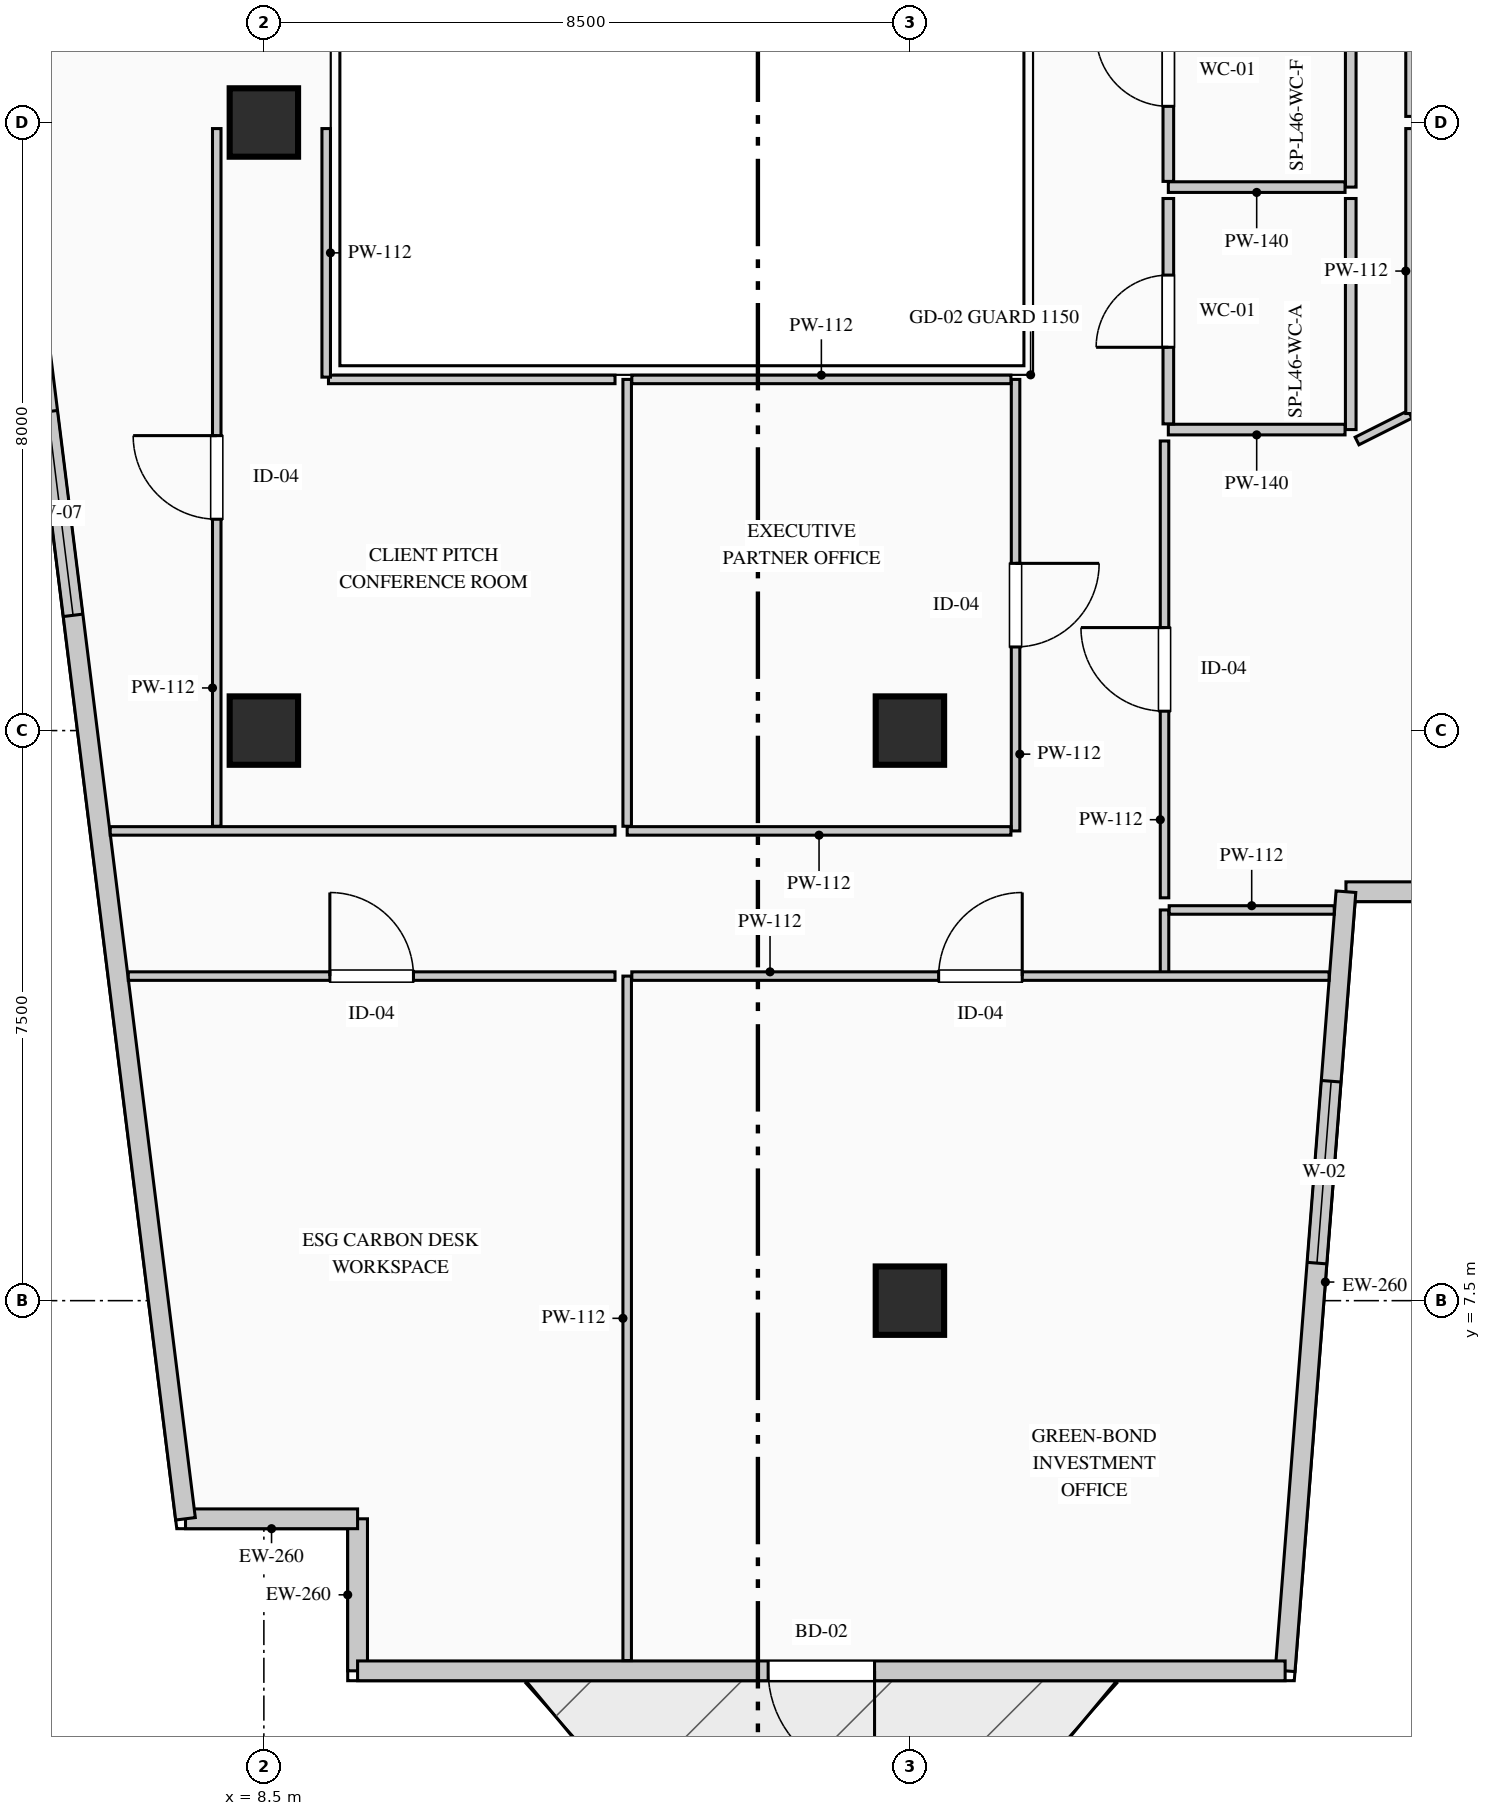
"""IFC4 building model, lengths in metres.
Left out: names, types, materials, properties, quantities, classifications, styles, units other than length and angle.
Written with IfcOpenShell. Run it as: python <this file> out.ifc"""

import sys

from ifc_helpers import new_model, si_unit, direction, frame, frame_2d, origin, origin_2d, place, context, subcontext, project, spatial, rectangle, extrude, element, fill, save


model = new_model("IFC4")
c1 = context("Model", 3, precision=1e-05, world=origin(), true_north=direction((0.0, 1.0)))
c2 = subcontext(c1, "Body", "Model", "MODEL_VIEW")
j1 = project(units=[si_unit("LENGTHUNIT", "METRE"), si_unit("PLANEANGLEUNIT", "RADIAN")], contexts=[c1])
p1 = place(None, origin())
s1 = spatial("IfcSite", under=j1, at=p1, CompositionType="ELEMENT")
p2 = place(p1, origin())
s2 = spatial("IfcBuilding", under=s1, at=p2, CompositionType="ELEMENT")
p3 = place(p2, frame((0.0, 0.0, 195.6)))
s3 = spatial("IfcBuildingStorey", under=s2, at=p3, CompositionType="ELEMENT", Elevation=195.6)
for number, where, z_axis, x_axis in (
    (1, (8.5, 15.0, 0.0), (0.0, 0.0, 1.0), (1.0, 0.0, 0.0)),
    (2, (8.5, 23.0, 0.0), (0.0, 0.0, 1.0), (1.0, 0.0, 0.0)),
    (3, (17.0, 7.5, 0.0), (0.0, 0.0, 1.0), (1.0, 0.0, 0.0)),
    (4, (17.0, 15.0, 0.0), (0.0, 0.0, 1.0), (1.0, 0.0, 0.0)),
):
    element("IfcColumn", number, at=place(p3, frame(where, z_axis=z_axis, x_axis=x_axis)), inside=s3, PredefinedType="COLUMN", context=c2, shape_type="SweptSolid", body=[
        extrude(rectangle(XDim=0.9, YDim=0.9, at=origin_2d()), origin(), (0.0, 0.0, 1.0), 3.95),
    ])
p4 = place(p3, frame((9.733, 2.63, 0.0), z_axis=(0.0, 0.0, 1.0), x_axis=(0.0, 1.0, 0.0)))
e5 = element("IfcWall", 5, at=p4, inside=s3, PredefinedType="STANDARD", context=c2, shape_type="SweptSolid", body=[
    extrude(rectangle(XDim=2.0, YDim=0.26, at=frame_2d((1.0, 0.0))), origin(), (0.0, 0.0, 1.0), 3.7),
])
p5 = place(p3, frame((9.733, 4.63, 0.0), z_axis=(0.0, 0.0, 1.0), x_axis=(-1.0, 0.0, 0.0)))
e6 = element("IfcWall", 6, at=p5, inside=s3, PredefinedType="STANDARD", context=c2, shape_type="SweptSolid", body=[
    extrude(rectangle(XDim=2.264, YDim=0.26, at=frame_2d((1.132, 0.0))), origin(), (0.0, 0.0, 1.0), 3.7),
])
p6 = place(p3, frame((7.469, 4.63, 0.0), z_axis=(0.0, 0.0, 1.0), x_axis=(-0.123515300309, 0.992342667928, 0.0)))
e7 = element("IfcWall", 7, at=p6, inside=s3, PredefinedType="STANDARD", context=c2, shape_type="SweptSolid", body=[
    extrude(rectangle(XDim=37.024, YDim=0.26, at=frame_2d((18.512, 0.0))), origin(), (0.0, 0.0, 1.0), 3.7),
])
p7 = place(p6, frame((11.978, 0.0, 0.9)))
e8 = element("IfcOpeningElement", 8, at=p7, cuts=e7, PredefinedType="OPENING", context=c2, shape_type="SweptSolid", body=[
    extrude(rectangle(XDim=2.7, YDim=2.1, at=frame_2d((1.35, 1.05))), frame((0.0, 0.14, 0.0), z_axis=(0.0, -1.0, 0.0), x_axis=(1.0, 0.0, 0.0)), (0.0, 0.0, 1.0), 0.28),
])
p8 = place(p3, frame((29.59, 12.88, 0.0), z_axis=(0.0, 0.0, 1.0), x_axis=(-1.0, 0.0, 0.0)))
e9 = element("IfcWall", 9, at=p8, inside=s3, PredefinedType="STANDARD", context=c2, shape_type="SweptSolid", body=[
    extrude(rectangle(XDim=6.853, YDim=0.26, at=frame_2d((3.426, 0.0))), origin(), (0.0, 0.0, 1.0), 3.7),
])
p9 = place(p8, frame((1.267, 0.0, 0.9)))
e10 = element("IfcOpeningElement", 10, at=p9, cuts=e9, PredefinedType="OPENING", context=c2, shape_type="SweptSolid", body=[
    extrude(rectangle(XDim=2.4, YDim=2.1, at=frame_2d((1.2, 1.05))), frame((0.0, 0.14, 0.0), z_axis=(0.0, -1.0, 0.0), x_axis=(1.0, 0.0, 0.0)), (0.0, 0.0, 1.0), 0.28),
])
p10 = place(p3, frame((22.737, 12.88, 0.0), z_axis=(0.0, 0.0, 1.0), x_axis=(-0.077816860153, -0.996967670627, 0.0)))
e11 = element("IfcWall", 11, at=p10, inside=s3, PredefinedType="STANDARD", context=c2, shape_type="SweptSolid", body=[
    extrude(rectangle(XDim=10.281, YDim=0.26, at=frame_2d((5.141, 0.0))), origin(), (0.0, 0.0, 1.0), 3.7),
])
p11 = place(p10, frame((2.501, 0.0, 0.9)))
e12 = element("IfcOpeningElement", 12, at=p11, cuts=e11, PredefinedType="OPENING", context=c2, shape_type="SweptSolid", body=[
    extrude(rectangle(XDim=2.4, YDim=2.1, at=frame_2d((1.2, 1.05))), frame((0.0, 0.14, 0.0), z_axis=(0.0, -1.0, 0.0), x_axis=(1.0, 0.0, 0.0)), (0.0, 0.0, 1.0), 0.28),
])
p12 = place(p3, frame((21.937, 2.63, 0.0), z_axis=(0.0, 0.0, 1.0), x_axis=(-1.0, 0.0, 0.0)))
e13 = element("IfcWall", 13, at=p12, inside=s3, PredefinedType="STANDARD", context=c2, shape_type="SweptSolid", body=[
    extrude(rectangle(XDim=12.204, YDim=0.26, at=frame_2d((6.102, 0.0))), origin(), (0.0, 0.0, 1.0), 3.7),
])
p13 = place(p12, frame((5.402, 0.0, 0.0)))
e14 = element("IfcOpeningElement", 14, at=p13, cuts=e13, PredefinedType="OPENING", context=c2, shape_type="SweptSolid", body=[
    extrude(rectangle(XDim=1.4, YDim=2.2, at=frame_2d((0.7, 1.1))), frame((0.0, 0.14, 0.0), z_axis=(0.0, -1.0, 0.0), x_axis=(1.0, 0.0, 0.0)), (0.0, 0.0, 1.0), 0.28),
])
p14 = place(p3, frame((22.8, 25.15, 0.0), z_axis=(0.0, 0.0, 1.0), x_axis=(0.0, -1.0, 0.0)))
e15 = element("IfcWall", 15, at=p14, inside=s3, PredefinedType="PARTITIONING", context=c2, shape_type="SweptSolid", body=[
    extrude(rectangle(XDim=3.0, YDim=0.14, at=frame_2d((1.5, 0.0))), origin(), (0.0, 0.0, 1.0), 3.285),
])
p15 = place(p3, frame((22.725, 22.15, 0.0), z_axis=(0.0, 0.0, 1.0), x_axis=(-1.0, 0.0, 0.0)))
e16 = element("IfcWall", 16, at=p15, inside=s3, PredefinedType="PARTITIONING", context=c2, shape_type="SweptSolid", body=[
    extrude(rectangle(XDim=2.325, YDim=0.14, at=frame_2d((1.163, 0.0))), origin(), (0.0, 0.0, 1.0), 3.7),
])
p16 = place(p3, frame((20.4, 22.225, 0.0), z_axis=(0.0, 0.0, 1.0), x_axis=(0.0, 1.0, 0.0)))
e17 = element("IfcWall", 17, at=p16, inside=s3, PredefinedType="PARTITIONING", context=c2, shape_type="SweptSolid", body=[
    extrude(rectangle(XDim=2.925, YDim=0.14, at=frame_2d((1.462, 0.0))), origin(), (0.0, 0.0, 1.0), 3.7),
])
p17 = place(p16, frame((0.988, 0.0, 0.0)))
e18 = element("IfcOpeningElement", 18, at=p17, cuts=e17, PredefinedType="OPENING", context=c2, shape_type="SweptSolid", body=[
    extrude(rectangle(XDim=0.95, YDim=2.15, at=frame_2d((0.475, 1.075))), frame((0.0, 0.08, 0.0), z_axis=(0.0, -1.0, 0.0), x_axis=(1.0, 0.0, 0.0)), (0.0, 0.0, 1.0), 0.16),
])
p18 = place(p3, frame((22.8, 22.0, 0.0), z_axis=(0.0, 0.0, 1.0), x_axis=(0.0, -1.0, 0.0)))
e19 = element("IfcWall", 19, at=p18, inside=s3, PredefinedType="PARTITIONING", context=c2, shape_type="SweptSolid", body=[
    extrude(rectangle(XDim=3.04, YDim=0.14, at=frame_2d((1.52, 0.0))), origin(), (0.0, 0.0, 1.0), 3.285),
])
p19 = place(p3, frame((22.725, 18.96, 0.0), z_axis=(0.0, 0.0, 1.0), x_axis=(-1.0, 0.0, 0.0)))
e20 = element("IfcWall", 20, at=p19, inside=s3, PredefinedType="PARTITIONING", context=c2, shape_type="SweptSolid", body=[
    extrude(rectangle(XDim=2.325, YDim=0.14, at=frame_2d((1.163, 0.0))), origin(), (0.0, 0.0, 1.0), 3.7),
])
p20 = place(p3, frame((20.4, 19.035, 0.0), z_axis=(0.0, 0.0, 1.0), x_axis=(0.0, 1.0, 0.0)))
e21 = element("IfcWall", 21, at=p20, inside=s3, PredefinedType="PARTITIONING", context=c2, shape_type="SweptSolid", body=[
    extrude(rectangle(XDim=2.965, YDim=0.14, at=frame_2d((1.482, 0.0))), origin(), (0.0, 0.0, 1.0), 3.7),
])
p21 = place(p20, frame((1.008, 0.0, 0.0)))
e22 = element("IfcOpeningElement", 22, at=p21, cuts=e21, PredefinedType="OPENING", context=c2, shape_type="SweptSolid", body=[
    extrude(rectangle(XDim=0.95, YDim=2.15, at=frame_2d((0.475, 1.075))), frame((0.0, 0.08, 0.0), z_axis=(0.0, -1.0, 0.0), x_axis=(1.0, 0.0, 0.0)), (0.0, 0.0, 1.0), 0.16),
])
p22 = place(p3, frame((20.35, 11.8, 0.0), z_axis=(0.0, 0.0, 1.0), x_axis=(0.0, 1.0, 0.0)))
e23 = element("IfcWall", 23, at=p22, inside=s3, PredefinedType="PARTITIONING", context=c2, shape_type="SweptSolid", body=[
    extrude(rectangle(XDim=0.84, YDim=0.112, at=frame_2d((0.42, 0.0))), origin(), (0.0, 0.0, 1.0), 3.7),
])
p23 = place(p3, frame((20.411, 12.64, 0.0), z_axis=(0.0, 0.0, 1.0), x_axis=(1.0, 0.0, 0.0)))
e24 = element("IfcWall", 24, at=p23, inside=s3, PredefinedType="PARTITIONING", context=c2, shape_type="SweptSolid", body=[
    extrude(rectangle(XDim=2.172, YDim=0.112, at=frame_2d((1.086, 0.0))), origin(), (0.0, 0.0, 1.0), 3.7),
])
p24 = place(p3, frame((13.28, 2.765, 0.0), z_axis=(0.0, 0.0, 1.0), x_axis=(0.0, 1.0, 0.0)))
e25 = element("IfcWall", 25, at=p24, inside=s3, PredefinedType="PARTITIONING", context=c2, shape_type="SweptSolid", body=[
    extrude(rectangle(XDim=9.005, YDim=0.112, at=frame_2d((4.502, 0.0))), origin(), (0.0, 0.0, 1.0), 3.7),
])
p25 = place(p3, frame((13.341, 11.77, 0.0), z_axis=(0.0, 0.0, 1.0), x_axis=(1.0, 0.0, 0.0)))
e26 = element("IfcWall", 26, at=p25, inside=s3, PredefinedType="PARTITIONING", context=c2, shape_type="SweptSolid", body=[
    extrude(rectangle(XDim=9.174, YDim=0.112, at=frame_2d((4.587, 0.0))), origin(), (0.0, 0.0, 1.0), 3.7),
])
p26 = place(p25, frame((4.037, 0.0, 0.0)))
e27 = element("IfcOpeningElement", 27, at=p26, cuts=e26, PredefinedType="OPENING", context=c2, shape_type="SweptSolid", body=[
    extrude(rectangle(XDim=1.1, YDim=2.2, at=frame_2d((0.55, 1.1))), frame((0.0, 0.066, 0.0), z_axis=(0.0, -1.0, 0.0), x_axis=(1.0, 0.0, 0.0)), (0.0, 0.0, 1.0), 0.132),
])
p27 = place(p3, frame((6.716, 11.77, 0.0), z_axis=(0.0, 0.0, 1.0), x_axis=(1.0, 0.0, 0.0)))
e28 = element("IfcWall", 28, at=p27, inside=s3, PredefinedType="PARTITIONING", context=c2, shape_type="SweptSolid", body=[
    extrude(rectangle(XDim=6.404, YDim=0.112, at=frame_2d((3.202, 0.0))), origin(), (0.0, 0.0, 1.0), 3.7),
])
p28 = place(p27, frame((2.652, 0.0, 0.0)))
e29 = element("IfcOpeningElement", 29, at=p28, cuts=e28, PredefinedType="OPENING", context=c2, shape_type="SweptSolid", body=[
    extrude(rectangle(XDim=1.1, YDim=2.2, at=frame_2d((0.55, 1.1))), frame((0.0, 0.066, 0.0), z_axis=(0.0, -1.0, 0.0), x_axis=(1.0, 0.0, 0.0)), (0.0, 0.0, 1.0), 0.132),
])
p29 = place(p3, frame((20.35, 12.8, 0.0), z_axis=(0.0, 0.0, 1.0), x_axis=(0.0, 1.0, 0.0)))
e30 = element("IfcWall", 30, at=p29, inside=s3, PredefinedType="PARTITIONING", context=c2, shape_type="SweptSolid", body=[
    extrude(rectangle(XDim=6.01, YDim=0.112, at=frame_2d((3.005, 0.0))), origin(), (0.0, 0.0, 1.0), 3.7),
])
p30 = place(p29, frame((2.455, 0.0, 0.0)))
e31 = element("IfcOpeningElement", 31, at=p30, cuts=e30, PredefinedType="OPENING", context=c2, shape_type="SweptSolid", body=[
    extrude(rectangle(XDim=1.1, YDim=2.2, at=frame_2d((0.55, 1.1))), frame((0.0, 0.066, 0.0), z_axis=(0.0, -1.0, 0.0), x_axis=(1.0, 0.0, 0.0)), (0.0, 0.0, 1.0), 0.132),
])
p31 = place(p3, frame((22.883, 18.81, 0.0), z_axis=(0.0, 0.0, 1.0), x_axis=(0.893737436086, 0.448590453909, 0.0)))
e32 = element("IfcWall", 32, at=p31, inside=s3, PredefinedType="PARTITIONING", context=c2, shape_type="SweptSolid", body=[
    extrude(rectangle(XDim=0.78, YDim=0.112, at=frame_2d((0.39, 0.0))), origin(), (0.0, 0.0, 1.0), 3.7),
])
p32 = place(p3, frame((23.58, 19.171, 0.0), z_axis=(0.0, 0.0, 1.0), x_axis=(0.0, 1.0, 0.0)))
e33 = element("IfcWall", 33, at=p32, inside=s3, PredefinedType="PARTITIONING", context=c2, shape_type="SweptSolid", body=[
    extrude(rectangle(XDim=3.749, YDim=0.112, at=frame_2d((1.875, 0.0))), origin(), (0.0, 0.0, 1.0), 3.7),
])
p33 = place(p3, frame((18.39, 19.62, 0.0), z_axis=(0.0, 0.0, 1.0), x_axis=(0.0, -1.0, 0.0)))
e34 = element("IfcWall", 34, at=p33, inside=s3, PredefinedType="PARTITIONING", context=c2, shape_type="SweptSolid", body=[
    extrude(rectangle(XDim=5.94, YDim=0.112, at=frame_2d((2.97, 0.0))), origin(), (0.0, 0.0, 1.0), 3.7),
])
p34 = place(p33, frame((2.42, 0.0, 0.0)))
e35 = element("IfcOpeningElement", 35, at=p34, cuts=e34, PredefinedType="OPENING", context=c2, shape_type="SweptSolid", body=[
    extrude(rectangle(XDim=1.1, YDim=2.2, at=frame_2d((0.55, 1.1))), frame((0.0, 0.066, 0.0), z_axis=(0.0, -1.0, 0.0), x_axis=(1.0, 0.0, 0.0)), (0.0, 0.0, 1.0), 0.132),
])
p35 = place(p3, frame((18.329, 13.68, 0.0), z_axis=(0.0, 0.0, 1.0), x_axis=(-1.0, 0.0, 0.0)))
e36 = element("IfcWall", 36, at=p35, inside=s3, PredefinedType="PARTITIONING", context=c2, shape_type="SweptSolid", body=[
    extrude(rectangle(XDim=5.049, YDim=0.112, at=frame_2d((2.524, 0.0))), origin(), (0.0, 0.0, 1.0), 3.7),
])
p36 = place(p3, frame((13.28, 13.741, 0.0), z_axis=(0.0, 0.0, 1.0), x_axis=(0.0, 1.0, 0.0)))
e37 = element("IfcWall", 37, at=p36, inside=s3, PredefinedType="PARTITIONING", context=c2, shape_type="SweptSolid", body=[
    extrude(rectangle(XDim=5.879, YDim=0.112, at=frame_2d((2.939, 0.0))), origin(), (0.0, 0.0, 1.0), 3.7),
])
p37 = place(p3, frame((13.341, 19.62, 0.0), z_axis=(0.0, 0.0, 1.0), x_axis=(1.0, 0.0, 0.0)))
e38 = element("IfcWall", 38, at=p37, inside=s3, PredefinedType="PARTITIONING", context=c2, shape_type="SweptSolid", body=[
    extrude(rectangle(XDim=4.988, YDim=0.112, at=frame_2d((2.494, 0.0))), origin(), (0.0, 0.0, 1.0), 3.7),
])
p38 = place(p3, frame((9.35, 19.62, 0.0), z_axis=(0.0, 0.0, 1.0), x_axis=(1.0, 0.0, 0.0)))
e39 = element("IfcWall", 39, at=p38, inside=s3, PredefinedType="PARTITIONING", context=c2, shape_type="SweptSolid", body=[
    extrude(rectangle(XDim=3.77, YDim=0.112, at=frame_2d((1.885, 0.0))), origin(), (0.0, 0.0, 1.0), 3.7),
])
p39 = place(p3, frame((13.12, 13.68, 0.0), z_axis=(0.0, 0.0, 1.0), x_axis=(-1.0, 0.0, 0.0)))
e40 = element("IfcWall", 40, at=p39, inside=s3, PredefinedType="PARTITIONING", context=c2, shape_type="SweptSolid", body=[
    extrude(rectangle(XDim=6.642, YDim=0.112, at=frame_2d((3.321, 0.0))), origin(), (0.0, 0.0, 1.0), 3.7),
])
p40 = place(p3, frame((7.88, 13.741, 0.0), z_axis=(0.0, 0.0, 1.0), x_axis=(0.0, 1.0, 0.0)))
e41 = element("IfcWall", 41, at=p40, inside=s3, PredefinedType="PARTITIONING", context=c2, shape_type="SweptSolid", body=[
    extrude(rectangle(XDim=9.179, YDim=0.112, at=frame_2d((4.589, 0.0))), origin(), (0.0, 0.0, 1.0), 3.7),
])
p41 = place(p40, frame((4.04, 0.0, 0.0)))
e42 = element("IfcOpeningElement", 42, at=p41, cuts=e41, PredefinedType="OPENING", context=c2, shape_type="SweptSolid", body=[
    extrude(rectangle(XDim=1.1, YDim=2.2, at=frame_2d((0.55, 1.1))), frame((0.0, 0.066, 0.0), z_axis=(0.0, -1.0, 0.0), x_axis=(1.0, 0.0, 0.0)), (0.0, 0.0, 1.0), 0.132),
])
p42 = place(p3, frame((9.32, 22.92, 0.0), z_axis=(0.0, 0.0, 1.0), x_axis=(0.0, -1.0, 0.0)))
e43 = element("IfcWall", 43, at=p42, inside=s3, PredefinedType="PARTITIONING", context=c2, shape_type="SweptSolid", body=[
    extrude(rectangle(XDim=3.27, YDim=0.112, at=frame_2d((1.635, 0.0))), origin(), (0.0, 0.0, 1.0), 3.485),
])
p43 = place(p3, frame((23.58, 23.08, 0.0), z_axis=(0.0, 0.0, 1.0), x_axis=(0.0, 1.0, 0.0)))
e44 = element("IfcWall", 44, at=p43, inside=s3, PredefinedType="PARTITIONING", context=c2, shape_type="SweptSolid", body=[
    extrude(rectangle(XDim=5.94, YDim=0.112, at=frame_2d((2.97, 0.0))), origin(), (0.0, 0.0, 1.0), 3.7),
])
p44 = place(p7, origin())
e45 = element("IfcWindow", 45, at=p44, inside=s3, PartitioningType="DOUBLE_PANEL_VERTICAL", PredefinedType="WINDOW", context=c2, shape_type="SweptSolid", body=[
    extrude(rectangle(XDim=2.7, YDim=2.1, at=frame_2d((1.35, 1.05))), frame((0.0, 0.03, 0.0), z_axis=(0.0, -1.0, 0.0), x_axis=(1.0, 0.0, 0.0)), (0.0, 0.0, 1.0), 0.06),
])
fill(e8, e45)
p45 = place(p11, origin())
e46 = element("IfcWindow", 46, at=p45, inside=s3, PartitioningType="DOUBLE_PANEL_VERTICAL", PredefinedType="WINDOW", context=c2, shape_type="SweptSolid", body=[
    extrude(rectangle(XDim=2.4, YDim=2.1, at=frame_2d((1.2, 1.05))), frame((0.0, 0.03, 0.0), z_axis=(0.0, -1.0, 0.0), x_axis=(1.0, 0.0, 0.0)), (0.0, 0.0, 1.0), 0.06),
])
fill(e12, e46)
p46 = place(p13, origin())
e47 = element("IfcDoor", 47, at=p46, inside=s3, OperationType="SINGLE_SWING_LEFT", PredefinedType="DOOR", context=c2, shape_type="SweptSolid", body=[
    extrude(rectangle(XDim=1.4, YDim=2.2, at=frame_2d((0.7, 1.1))), frame((0.0, 0.025, 0.0), z_axis=(0.0, -1.0, 0.0), x_axis=(1.0, 0.0, 0.0)), (0.0, 0.0, 1.0), 0.05),
])
fill(e14, e47)
p47 = place(p17, origin())
e48 = element("IfcDoor", 48, at=p47, inside=s3, OperationType="SINGLE_SWING_RIGHT", PredefinedType="DOOR", context=c2, shape_type="SweptSolid", body=[
    extrude(rectangle(XDim=0.95, YDim=2.15, at=frame_2d((0.475, 1.075))), frame((0.0, 0.025, 0.0), z_axis=(0.0, -1.0, 0.0), x_axis=(1.0, 0.0, 0.0)), (0.0, 0.0, 1.0), 0.05),
])
fill(e18, e48)
p48 = place(p21, origin())
e49 = element("IfcDoor", 49, at=p48, inside=s3, OperationType="SINGLE_SWING_LEFT", PredefinedType="DOOR", context=c2, shape_type="SweptSolid", body=[
    extrude(rectangle(XDim=0.95, YDim=2.15, at=frame_2d((0.475, 1.075))), frame((0.0, 0.025, 0.0), z_axis=(0.0, -1.0, 0.0), x_axis=(1.0, 0.0, 0.0)), (0.0, 0.0, 1.0), 0.05),
])
fill(e22, e49)
p49 = place(p26, origin())
e50 = element("IfcDoor", 50, at=p49, inside=s3, OperationType="SINGLE_SWING_RIGHT", PredefinedType="DOOR", context=c2, shape_type="SweptSolid", body=[
    extrude(rectangle(XDim=1.1, YDim=2.2, at=frame_2d((0.55, 1.1))), frame((0.0, 0.025, 0.0), z_axis=(0.0, -1.0, 0.0), x_axis=(1.0, 0.0, 0.0)), (0.0, 0.0, 1.0), 0.05),
])
fill(e27, e50)
p50 = place(p28, origin())
e51 = element("IfcDoor", 51, at=p50, inside=s3, OperationType="SINGLE_SWING_LEFT", PredefinedType="DOOR", context=c2, shape_type="SweptSolid", body=[
    extrude(rectangle(XDim=1.1, YDim=2.2, at=frame_2d((0.55, 1.1))), frame((0.0, 0.025, 0.0), z_axis=(0.0, -1.0, 0.0), x_axis=(1.0, 0.0, 0.0)), (0.0, 0.0, 1.0), 0.05),
])
fill(e29, e51)
p51 = place(p30, origin())
e52 = element("IfcDoor", 52, at=p51, inside=s3, OperationType="SINGLE_SWING_RIGHT", PredefinedType="DOOR", context=c2, shape_type="SweptSolid", body=[
    extrude(rectangle(XDim=1.1, YDim=2.2, at=frame_2d((0.55, 1.1))), frame((0.0, 0.025, 0.0), z_axis=(0.0, -1.0, 0.0), x_axis=(1.0, 0.0, 0.0)), (0.0, 0.0, 1.0), 0.05),
])
fill(e31, e52)
p52 = place(p34, origin())
e53 = element("IfcDoor", 53, at=p52, inside=s3, OperationType="SINGLE_SWING_LEFT", PredefinedType="DOOR", context=c2, shape_type="SweptSolid", body=[
    extrude(rectangle(XDim=1.1, YDim=2.2, at=frame_2d((0.55, 1.1))), frame((0.0, 0.025, 0.0), z_axis=(0.0, -1.0, 0.0), x_axis=(1.0, 0.0, 0.0)), (0.0, 0.0, 1.0), 0.05),
])
fill(e35, e53)
p53 = place(p41, origin())
e54 = element("IfcDoor", 54, at=p53, inside=s3, OperationType="SINGLE_SWING_RIGHT", PredefinedType="DOOR", context=c2, shape_type="SweptSolid", body=[
    extrude(rectangle(XDim=1.1, YDim=2.2, at=frame_2d((0.55, 1.1))), frame((0.0, 0.025, 0.0), z_axis=(0.0, -1.0, 0.0), x_axis=(1.0, 0.0, 0.0)), (0.0, 0.0, 1.0), 0.05),
])
fill(e42, e54)
save(model, sys.argv[1])
